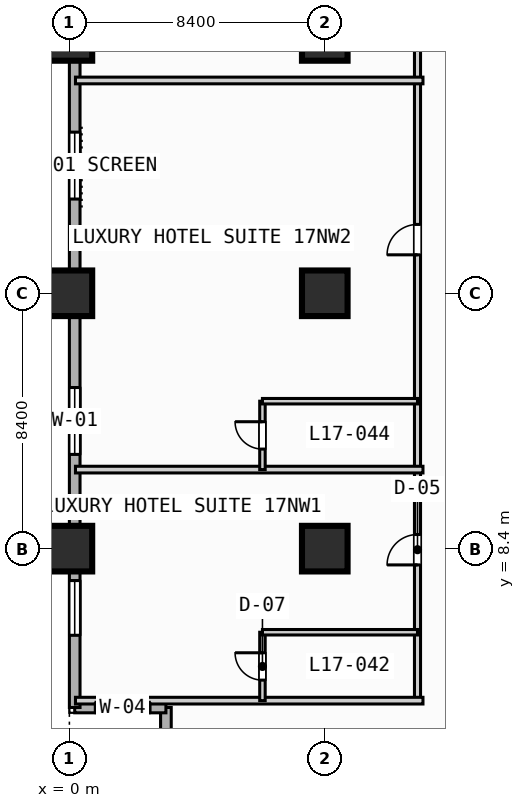
"""IFC4 building model, lengths in metres.
Left out: names, types, materials, properties, quantities, classifications, styles, units other than length and angle.
Written with IfcOpenShell. Run it as: python <this file> out.ifc"""

import sys

from ifc_helpers import new_model, si_unit, direction, frame, frame_2d, origin, origin_2d, place, context, subcontext, project, spatial, rectangle, extrude, element, fill, save


model = new_model("IFC4")
c1 = context("Model", 3, precision=1e-05, world=origin(), true_north=direction((0.0, 1.0)))
c2 = subcontext(c1, "Body", "Model", "MODEL_VIEW")
j1 = project(units=[si_unit("LENGTHUNIT", "METRE"), si_unit("PLANEANGLEUNIT", "RADIAN")], contexts=[c1])
p1 = place(None, origin())
s1 = spatial("IfcSite", under=j1, at=p1, CompositionType="ELEMENT")
p2 = place(p1, origin())
s2 = spatial("IfcBuilding", under=s1, at=p2, CompositionType="ELEMENT")
p3 = place(p2, frame((0.0, 0.0, 73.8)))
s3 = spatial("IfcBuildingStorey", under=s2, at=p3, CompositionType="ELEMENT", Elevation=73.8)
for number, where, z_axis, x_axis in (
    (1, (0.0, 8.4, 0.0), (0.0, 0.0, 1.0), (1.0, 0.0, 0.0)),
    (2, (0.0, 16.8, 0.0), (0.0, 0.0, 1.0), (1.0, 0.0, 0.0)),
    (3, (0.0, 25.2, 0.0), (0.0, 0.0, 1.0), (1.0, 0.0, 0.0)),
    (4, (8.4, 8.4, 0.0), (0.0, 0.0, 1.0), (1.0, 0.0, 0.0)),
    (5, (8.4, 16.8, 0.0), (0.0, 0.0, 1.0), (1.0, 0.0, 0.0)),
    (6, (8.4, 25.2, 0.0), (0.0, 0.0, 1.0), (1.0, 0.0, 0.0)),
):
    element("IfcColumn", number, at=place(p3, frame(where, z_axis=z_axis, x_axis=x_axis)), inside=s3, PredefinedType="COLUMN", context=c2, shape_type="SweptSolid", body=[
        extrude(rectangle(XDim=1.5, YDim=1.5, at=origin_2d()), origin(), (0.0, 0.0, 1.0), 3.8),
    ])
p4 = place(p3, frame((3.175, 0.175, 0.0), z_axis=(0.0, 0.0, 1.0), x_axis=(0.0, 1.0, 0.0)))
e7 = element("IfcWall", 7, at=p4, inside=s3, PredefinedType="STANDARD", context=c2, shape_type="SweptSolid", body=[
    extrude(rectangle(XDim=3.0, YDim=0.35, at=frame_2d((1.5, 0.0))), origin(), (0.0, 0.0, 1.0), 3.55),
])
p5 = place(p3, frame((3.175, 3.175, 0.0), z_axis=(0.0, 0.0, 1.0), x_axis=(-1.0, 0.0, 0.0)))
e8 = element("IfcWall", 8, at=p5, inside=s3, PredefinedType="STANDARD", context=c2, shape_type="SweptSolid", body=[
    extrude(rectangle(XDim=3.0, YDim=0.35, at=frame_2d((1.5, 0.0))), origin(), (0.0, 0.0, 1.0), 3.55),
])
p6 = place(p5, frame((0.522, 0.0, 0.85)))
e9 = element("IfcOpeningElement", 9, at=p6, cuts=e8, PredefinedType="OPENING", context=c2, shape_type="SweptSolid", body=[
    extrude(rectangle(XDim=1.8, YDim=1.8, at=frame_2d((0.9, 0.9))), frame((0.0, 0.185, 0.0), z_axis=(0.0, -1.0, 0.0), x_axis=(1.0, 0.0, 0.0)), (0.0, 0.0, 1.0), 0.37),
])
p7 = place(p3, frame((0.175, 3.175, 0.0), z_axis=(0.0, 0.0, 1.0), x_axis=(0.0, 1.0, 0.0)))
e10 = element("IfcWall", 10, at=p7, inside=s3, PredefinedType="STANDARD", context=c2, shape_type="SweptSolid", body=[
    extrude(rectangle(XDim=86.05, YDim=0.35, at=frame_2d((43.025, 0.0))), origin(), (0.0, 0.0, 1.0), 3.55),
])
p8 = place(p7, frame((42.325, 0.0, 0.0)))
e11 = element("IfcOpeningElement", 11, at=p8, cuts=e10, PredefinedType="OPENING", context=c2, shape_type="SweptSolid", body=[
    extrude(rectangle(XDim=1.4, YDim=2.2, at=frame_2d((0.7, 1.1))), frame((0.0, 0.185, 0.0), z_axis=(0.0, -1.0, 0.0), x_axis=(1.0, 0.0, 0.0)), (0.0, 0.0, 1.0), 0.37),
])
p9 = place(p7, frame((8.325, 0.0, 0.85)))
e12 = element("IfcOpeningElement", 12, at=p9, cuts=e10, PredefinedType="OPENING", context=c2, shape_type="SweptSolid", body=[
    extrude(rectangle(XDim=2.2, YDim=1.8, at=frame_2d((1.1, 0.9))), frame((0.0, 0.185, 0.0), z_axis=(0.0, -1.0, 0.0), x_axis=(1.0, 0.0, 0.0)), (0.0, 0.0, 1.0), 0.37),
])
p10 = place(p7, frame((16.725, 0.0, 0.85)))
e13 = element("IfcOpeningElement", 13, at=p10, cuts=e10, PredefinedType="OPENING", context=c2, shape_type="SweptSolid", body=[
    extrude(rectangle(XDim=2.2, YDim=1.8, at=frame_2d((1.1, 0.9))), frame((0.0, 0.185, 0.0), z_axis=(0.0, -1.0, 0.0), x_axis=(1.0, 0.0, 0.0)), (0.0, 0.0, 1.0), 0.37),
])
p11 = place(p7, frame((25.125, 0.0, 0.85)))
e14 = element("IfcOpeningElement", 14, at=p11, cuts=e10, PredefinedType="OPENING", context=c2, shape_type="SweptSolid", body=[
    extrude(rectangle(XDim=2.2, YDim=1.8, at=frame_2d((1.1, 0.9))), frame((0.0, 0.185, 0.0), z_axis=(0.0, -1.0, 0.0), x_axis=(1.0, 0.0, 0.0)), (0.0, 0.0, 1.0), 0.37),
])
p12 = place(p7, frame((33.525, 0.0, 0.85)))
e15 = element("IfcOpeningElement", 15, at=p12, cuts=e10, PredefinedType="OPENING", context=c2, shape_type="SweptSolid", body=[
    extrude(rectangle(XDim=2.2, YDim=1.8, at=frame_2d((1.1, 0.9))), frame((0.0, 0.185, 0.0), z_axis=(0.0, -1.0, 0.0), x_axis=(1.0, 0.0, 0.0)), (0.0, 0.0, 1.0), 0.37),
])
p13 = place(p7, frame((2.375, 0.0, 0.85)))
e16 = element("IfcOpeningElement", 16, at=p13, cuts=e10, PredefinedType="OPENING", context=c2, shape_type="SweptSolid", body=[
    extrude(rectangle(XDim=1.8, YDim=1.8, at=frame_2d((0.9, 0.9))), frame((0.0, 0.185, 0.0), z_axis=(0.0, -1.0, 0.0), x_axis=(1.0, 0.0, 0.0)), (0.0, 0.0, 1.0), 0.37),
])
p14 = place(p7, frame((56.475, 0.0, 0.85)))
e17 = element("IfcOpeningElement", 17, at=p14, cuts=e10, PredefinedType="OPENING", context=c2, shape_type="SweptSolid", body=[
    extrude(rectangle(XDim=1.8, YDim=1.8, at=frame_2d((0.9, 0.9))), frame((0.0, 0.185, 0.0), z_axis=(0.0, -1.0, 0.0), x_axis=(1.0, 0.0, 0.0)), (0.0, 0.0, 1.0), 0.37),
])
p15 = place(p3, frame((11.45, 3.4, 0.0), z_axis=(0.0, 0.0, 1.0), x_axis=(0.0, 1.0, 0.0)))
e18 = element("IfcWall", 18, at=p15, inside=s3, PredefinedType="PARTITIONING", context=c2, shape_type="SweptSolid", body=[
    extrude(rectangle(XDim=60.4, YDim=0.2, at=frame_2d((30.2, 0.0))), origin(), (0.0, 0.0, 1.0), 3.55),
])
p16 = place(p15, frame((4.465, 0.0, 0.0)))
e19 = element("IfcOpeningElement", 19, at=p16, cuts=e18, PredefinedType="OPENING", context=c2, shape_type="SweptSolid", body=[
    extrude(rectangle(XDim=1.0, YDim=2.15, at=frame_2d((0.5, 1.075))), frame((0.0, 0.11, 0.0), z_axis=(0.0, -1.0, 0.0), x_axis=(1.0, 0.0, 0.0)), (0.0, 0.0, 1.0), 0.22),
])
p17 = place(p15, frame((14.665, 0.0, 0.0)))
e20 = element("IfcOpeningElement", 20, at=p17, cuts=e18, PredefinedType="OPENING", context=c2, shape_type="SweptSolid", body=[
    extrude(rectangle(XDim=1.0, YDim=2.15, at=frame_2d((0.5, 1.075))), frame((0.0, 0.11, 0.0), z_axis=(0.0, -1.0, 0.0), x_axis=(1.0, 0.0, 0.0)), (0.0, 0.0, 1.0), 0.22),
])
p18 = place(p15, frame((22.535, 0.0, 0.0)))
e21 = element("IfcOpeningElement", 21, at=p18, cuts=e18, PredefinedType="OPENING", context=c2, shape_type="SweptSolid", body=[
    extrude(rectangle(XDim=1.0, YDim=2.15, at=frame_2d((0.5, 1.075))), frame((0.0, 0.11, 0.0), z_axis=(0.0, -1.0, 0.0), x_axis=(1.0, 0.0, 0.0)), (0.0, 0.0, 1.0), 0.22),
])
p19 = place(p15, frame((31.16, 0.0, 0.0)))
e22 = element("IfcOpeningElement", 22, at=p19, cuts=e18, PredefinedType="OPENING", context=c2, shape_type="SweptSolid", body=[
    extrude(rectangle(XDim=1.0, YDim=2.15, at=frame_2d((0.5, 1.075))), frame((0.0, 0.11, 0.0), z_axis=(0.0, -1.0, 0.0), x_axis=(1.0, 0.0, 0.0)), (0.0, 0.0, 1.0), 0.22),
])
p20 = place(p15, frame((42.36, 0.0, 0.0)))
e23 = element("IfcOpeningElement", 23, at=p20, cuts=e18, PredefinedType="OPENING", context=c2, shape_type="SweptSolid", body=[
    extrude(rectangle(XDim=1.0, YDim=2.15, at=frame_2d((0.5, 1.075))), frame((0.0, 0.11, 0.0), z_axis=(0.0, -1.0, 0.0), x_axis=(1.0, 0.0, 0.0)), (0.0, 0.0, 1.0), 0.22),
])
p21 = place(p15, frame((56.065, 0.0, 0.0)))
e24 = element("IfcOpeningElement", 24, at=p21, cuts=e18, PredefinedType="OPENING", context=c2, shape_type="SweptSolid", body=[
    extrude(rectangle(XDim=1.0, YDim=2.15, at=frame_2d((0.5, 1.075))), frame((0.0, 0.11, 0.0), z_axis=(0.0, -1.0, 0.0), x_axis=(1.0, 0.0, 0.0)), (0.0, 0.0, 1.0), 0.22),
])
p22 = place(p3, frame((0.2, 3.4, 0.0), z_axis=(0.0, 0.0, 1.0), x_axis=(1.0, 0.0, 0.0)))
e25 = element("IfcWall", 25, at=p22, inside=s3, PredefinedType="PARTITIONING", context=c2, shape_type="SweptSolid", body=[
    extrude(rectangle(XDim=11.43, YDim=0.22, at=frame_2d((5.715, 0.0))), origin(), (0.0, 0.0, 1.0), 3.55),
])
p23 = place(p3, frame((6.35, 3.4, 0.0), z_axis=(0.0, 0.0, 1.0), x_axis=(0.0, 1.0, 0.0)))
e26 = element("IfcWall", 26, at=p23, inside=s3, PredefinedType="PLUMBINGWALL", context=c2, shape_type="SweptSolid", body=[
    extrude(rectangle(XDim=2.25, YDim=0.18, at=frame_2d((1.125, 0.0))), origin(), (0.0, 0.0, 1.0), 3.55),
])
p24 = place(p23, frame((0.675, 0.0, 0.0)))
e27 = element("IfcOpeningElement", 27, at=p24, cuts=e26, PredefinedType="OPENING", context=c2, shape_type="SweptSolid", body=[
    extrude(rectangle(XDim=0.9, YDim=2.1, at=frame_2d((0.45, 1.05))), frame((0.0, 0.1, 0.0), z_axis=(0.0, -1.0, 0.0), x_axis=(1.0, 0.0, 0.0)), (0.0, 0.0, 1.0), 0.2),
])
p25 = place(p3, frame((6.35, 5.65, 0.0), z_axis=(0.0, 0.0, 1.0), x_axis=(1.0, 0.0, 0.0)))
e28 = element("IfcWall", 28, at=p25, inside=s3, PredefinedType="PLUMBINGWALL", context=c2, shape_type="SweptSolid", body=[
    extrude(rectangle(XDim=5.1, YDim=0.18, at=frame_2d((2.55, 0.0))), origin(), (0.0, 0.0, 1.0), 3.55),
])
p26 = place(p3, frame((0.2, 11.0, 0.0), z_axis=(0.0, 0.0, 1.0), x_axis=(1.0, 0.0, 0.0)))
e29 = element("IfcWall", 29, at=p26, inside=s3, PredefinedType="PARTITIONING", context=c2, shape_type="SweptSolid", body=[
    extrude(rectangle(XDim=11.43, YDim=0.22, at=frame_2d((5.715, 0.0))), origin(), (0.0, 0.0, 1.0), 3.55),
])
p27 = place(p3, frame((6.35, 11.0, 0.0), z_axis=(0.0, 0.0, 1.0), x_axis=(0.0, 1.0, 0.0)))
e30 = element("IfcWall", 30, at=p27, inside=s3, PredefinedType="PLUMBINGWALL", context=c2, shape_type="SweptSolid", body=[
    extrude(rectangle(XDim=2.25, YDim=0.18, at=frame_2d((1.125, 0.0))), origin(), (0.0, 0.0, 1.0), 3.55),
])
p28 = place(p27, frame((0.675, 0.0, 0.0)))
e31 = element("IfcOpeningElement", 31, at=p28, cuts=e30, PredefinedType="OPENING", context=c2, shape_type="SweptSolid", body=[
    extrude(rectangle(XDim=0.9, YDim=2.1, at=frame_2d((0.45, 1.05))), frame((0.0, 0.1, 0.0), z_axis=(0.0, -1.0, 0.0), x_axis=(1.0, 0.0, 0.0)), (0.0, 0.0, 1.0), 0.2),
])
p29 = place(p3, frame((6.35, 13.25, 0.0), z_axis=(0.0, 0.0, 1.0), x_axis=(1.0, 0.0, 0.0)))
e32 = element("IfcWall", 32, at=p29, inside=s3, PredefinedType="PLUMBINGWALL", context=c2, shape_type="SweptSolid", body=[
    extrude(rectangle(XDim=5.1, YDim=0.18, at=frame_2d((2.55, 0.0))), origin(), (0.0, 0.0, 1.0), 3.55),
])
p30 = place(p3, frame((0.2, 23.8, 0.0), z_axis=(0.0, 0.0, 1.0), x_axis=(1.0, 0.0, 0.0)))
e33 = element("IfcWall", 33, at=p30, inside=s3, PredefinedType="PARTITIONING", context=c2, shape_type="SweptSolid", body=[
    extrude(rectangle(XDim=11.43, YDim=0.22, at=frame_2d((5.715, 0.0))), origin(), (0.0, 0.0, 1.0), 3.55),
])
p31 = place(p6, origin())
e34 = element("IfcWindow", 34, at=p31, inside=s3, PartitioningType="SINGLE_PANEL", PredefinedType="WINDOW", context=c2, shape_type="SweptSolid", body=[
    extrude(rectangle(XDim=1.8, YDim=1.8, at=frame_2d((0.9, 0.9))), frame((0.0, 0.03, 0.0), z_axis=(0.0, -1.0, 0.0), x_axis=(1.0, 0.0, 0.0)), (0.0, 0.0, 1.0), 0.06),
])
fill(e9, e34)
p32 = place(p9, origin())
e35 = element("IfcWindow", 35, at=p32, inside=s3, PartitioningType="SINGLE_PANEL", PredefinedType="WINDOW", context=c2, shape_type="SweptSolid", body=[
    extrude(rectangle(XDim=2.2, YDim=1.8, at=frame_2d((1.1, 0.9))), frame((0.0, 0.03, 0.0), z_axis=(0.0, -1.0, 0.0), x_axis=(1.0, 0.0, 0.0)), (0.0, 0.0, 1.0), 0.06),
])
fill(e12, e35)
p33 = place(p10, origin())
e36 = element("IfcWindow", 36, at=p33, inside=s3, PartitioningType="SINGLE_PANEL", PredefinedType="WINDOW", context=c2, shape_type="SweptSolid", body=[
    extrude(rectangle(XDim=2.2, YDim=1.8, at=frame_2d((1.1, 0.9))), frame((0.0, 0.03, 0.0), z_axis=(0.0, -1.0, 0.0), x_axis=(1.0, 0.0, 0.0)), (0.0, 0.0, 1.0), 0.06),
])
fill(e13, e36)
p34 = place(p13, origin())
e37 = element("IfcWindow", 37, at=p34, inside=s3, PartitioningType="SINGLE_PANEL", PredefinedType="WINDOW", context=c2, shape_type="SweptSolid", body=[
    extrude(rectangle(XDim=1.8, YDim=1.8, at=frame_2d((0.9, 0.9))), frame((0.0, 0.03, 0.0), z_axis=(0.0, -1.0, 0.0), x_axis=(1.0, 0.0, 0.0)), (0.0, 0.0, 1.0), 0.06),
])
fill(e16, e37)
p35 = place(p16, origin())
e38 = element("IfcDoor", 38, at=p35, inside=s3, OperationType="SINGLE_SWING_LEFT", PredefinedType="DOOR", context=c2, shape_type="SweptSolid", body=[
    extrude(rectangle(XDim=1.0, YDim=2.15, at=frame_2d((0.5, 1.075))), frame((0.0, 0.025, 0.0), z_axis=(0.0, -1.0, 0.0), x_axis=(1.0, 0.0, 0.0)), (0.0, 0.0, 1.0), 0.05),
])
fill(e19, e38)
p36 = place(p17, origin())
e39 = element("IfcDoor", 39, at=p36, inside=s3, OperationType="SINGLE_SWING_LEFT", PredefinedType="DOOR", context=c2, shape_type="SweptSolid", body=[
    extrude(rectangle(XDim=1.0, YDim=2.15, at=frame_2d((0.5, 1.075))), frame((0.0, 0.025, 0.0), z_axis=(0.0, -1.0, 0.0), x_axis=(1.0, 0.0, 0.0)), (0.0, 0.0, 1.0), 0.05),
])
fill(e20, e39)
p37 = place(p24, origin())
e40 = element("IfcDoor", 40, at=p37, inside=s3, OperationType="SINGLE_SWING_RIGHT", PredefinedType="DOOR", context=c2, shape_type="SweptSolid", body=[
    extrude(rectangle(XDim=0.9, YDim=2.1, at=frame_2d((0.45, 1.05))), frame((0.0, 0.025, 0.0), z_axis=(0.0, -1.0, 0.0), x_axis=(1.0, 0.0, 0.0)), (0.0, 0.0, 1.0), 0.05),
])
fill(e27, e40)
p38 = place(p28, origin())
e41 = element("IfcDoor", 41, at=p38, inside=s3, OperationType="SINGLE_SWING_RIGHT", PredefinedType="DOOR", context=c2, shape_type="SweptSolid", body=[
    extrude(rectangle(XDim=0.9, YDim=2.1, at=frame_2d((0.45, 1.05))), frame((0.0, 0.025, 0.0), z_axis=(0.0, -1.0, 0.0), x_axis=(1.0, 0.0, 0.0)), (0.0, 0.0, 1.0), 0.05),
])
fill(e31, e41)
save(model, sys.argv[1])
